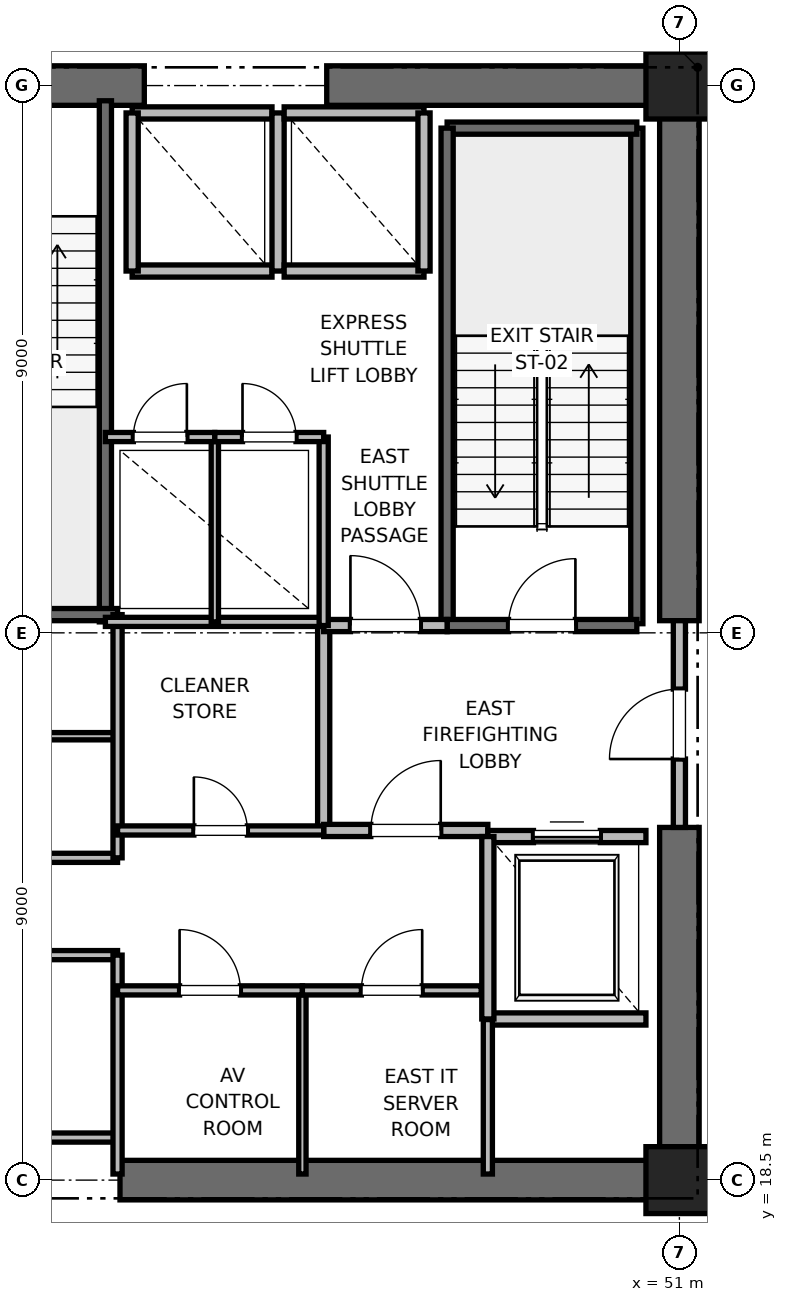
"""IFC4 building model, lengths in metres.
Left out: names, types, materials, properties, quantities, classifications, styles, units other than length and angle.
Written with IfcOpenShell. Run it as: python <this file> out.ifc"""

import sys

from ifc_helpers import new_model, si_unit, direction, frame, frame_2d, origin, origin_2d, place, context, subcontext, project, spatial, rectangle, extrude, element, fill, save


model = new_model("IFC4")
c1 = context("Model", 3, precision=1e-05, world=origin(), true_north=direction((0.0, 1.0)))
c2 = subcontext(c1, "Body", "Model", "MODEL_VIEW")
j1 = project(units=[si_unit("LENGTHUNIT", "METRE"), si_unit("PLANEANGLEUNIT", "RADIAN")], contexts=[c1])
p1 = place(None, origin())
s1 = spatial("IfcSite", under=j1, at=p1, CompositionType="ELEMENT")
p2 = place(p1, origin())
s2 = spatial("IfcBuilding", under=s1, at=p2, CompositionType="ELEMENT")
p3 = place(p2, frame((0.0, 0.0, 47.6)))
s3 = spatial("IfcBuildingStorey", under=s2, at=p3, CompositionType="ELEMENT", Elevation=47.6)
for number, where, z_axis, x_axis in (
    (1, (51.0, 18.5, 0.0), (0.0, 0.0, 1.0), (1.0, 0.0, 0.0)),
    (2, (51.0, 36.5, 0.0), (0.0, 0.0, 1.0), (1.0, 0.0, 0.0)),
):
    element("IfcColumn", number, at=place(p3, frame(where, z_axis=z_axis, x_axis=x_axis)), inside=s3, PredefinedType="PILASTER", context=c2, shape_type="SweptSolid", body=[
        extrude(rectangle(XDim=1.1, YDim=1.1, at=origin_2d()), origin(), (0.0, 0.0, 1.0), 4.0),
    ])
p4 = place(p3, frame((41.8, 18.5, 0.0), z_axis=(0.0, 0.0, 1.0), x_axis=(1.0, 0.0, 0.0)))
e3 = element("IfcWall", 3, at=p4, inside=s3, PredefinedType="SHEAR", context=c2, shape_type="SweptSolid", body=[
    extrude(rectangle(XDim=9.2, YDim=0.65, at=frame_2d((4.6, 0.0))), origin(), (0.0, 0.0, 1.0), 3.76),
])
p5 = place(p3, frame((37.8, 36.5, 0.0), z_axis=(0.0, 0.0, 1.0), x_axis=(1.0, 0.0, 0.0)))
e4 = element("IfcWall", 4, at=p5, inside=s3, PredefinedType="SHEAR", context=c2, shape_type="SweptSolid", body=[
    extrude(rectangle(XDim=4.4, YDim=0.65, at=frame_2d((2.2, 0.0))), origin(), (0.0, 0.0, 1.0), 3.76),
])
p6 = place(p5, frame((1.65, 0.0, 0.0)))
e5 = element("IfcOpeningElement", 5, at=p6, cuts=e4, PredefinedType="OPENING", context=c2, shape_type="SweptSolid", body=[
    extrude(rectangle(XDim=1.1, YDim=2.15, at=frame_2d((0.55, 1.075))), frame((0.0, 0.325, 0.0), z_axis=(0.0, -1.0, 0.0), x_axis=(1.0, 0.0, 0.0)), (0.0, 0.0, 1.0), 0.65),
])
for number, where, z_axis, x_axis in (
    (6, (45.2, 36.5, 0.0), (0.0, 0.0, 1.0), (1.0, 0.0, 0.0)),
    (7, (51.0, 18.5, 0.0), (0.0, 0.0, 1.0), (0.0, 1.0, 0.0)),
):
    element("IfcWall", number, at=place(p3, frame(where, z_axis=z_axis, x_axis=x_axis)), inside=s3, PredefinedType="SHEAR", context=c2, shape_type="SweptSolid", body=[
        extrude(rectangle(XDim=5.8, YDim=0.65, at=frame_2d((2.9, 0.0))), origin(), (0.0, 0.0, 1.0), 3.76),
    ])
p7 = place(p3, frame((51.0, 27.7, 0.0), z_axis=(0.0, 0.0, 1.0), x_axis=(0.0, 1.0, 0.0)))
e8 = element("IfcWall", 8, at=p7, inside=s3, PredefinedType="SHEAR", context=c2, shape_type="SweptSolid", body=[
    extrude(rectangle(XDim=8.8, YDim=0.65, at=frame_2d((4.4, 0.0))), origin(), (0.0, 0.0, 1.0), 3.76),
])
p8 = place(p3, frame((50.3, 27.65, 0.0), z_axis=(0.0, 0.0, 1.0), x_axis=(0.0, 1.0, 0.0)))
e9 = element("IfcWall", 9, at=p8, inside=s3, PredefinedType="SOLIDWALL", context=c2, shape_type="SweptSolid", body=[
    extrude(rectangle(XDim=8.15, YDim=0.2, at=frame_2d((4.075, 0.0))), origin(), (0.0, 0.0, 1.0), 3.76),
])
p9 = place(p3, frame((47.18, 35.8, 0.0), z_axis=(0.0, 0.0, 1.0), x_axis=(1.0, 0.0, 0.0)))
e10 = element("IfcWall", 10, at=p9, inside=s3, PredefinedType="SOLIDWALL", context=c2, shape_type="SweptSolid", body=[
    extrude(rectangle(XDim=3.12, YDim=0.2, at=frame_2d((1.56, 0.0))), origin(), (0.0, 0.0, 1.0), 3.76),
])
p10 = place(p3, frame((47.18, 27.62, 0.0), z_axis=(0.0, 0.0, 1.0), x_axis=(0.0, 1.0, 0.0)))
e11 = element("IfcWall", 11, at=p10, inside=s3, PredefinedType="SOLIDWALL", context=c2, shape_type="SweptSolid", body=[
    extrude(rectangle(XDim=8.18, YDim=0.2, at=frame_2d((4.09, 0.0))), origin(), (0.0, 0.0, 1.0), 3.76),
])
p11 = place(p3, frame((47.18, 27.62, 0.0), z_axis=(0.0, 0.0, 1.0), x_axis=(1.0, 0.0, 0.0)))
e12 = element("IfcWall", 12, at=p11, inside=s3, PredefinedType="SOLIDWALL", context=c2, shape_type="SweptSolid", body=[
    extrude(rectangle(XDim=3.12, YDim=0.2, at=frame_2d((1.56, 0.0))), origin(), (0.0, 0.0, 1.0), 3.76),
])
p12 = place(p11, frame((1.01, 0.0, 0.0)))
e13 = element("IfcOpeningElement", 13, at=p12, cuts=e12, PredefinedType="OPENING", context=c2, shape_type="SweptSolid", body=[
    extrude(rectangle(XDim=1.1, YDim=2.15, at=frame_2d((0.55, 1.075))), frame((0.0, 0.1, 0.0), z_axis=(0.0, -1.0, 0.0), x_axis=(1.0, 0.0, 0.0)), (0.0, 0.0, 1.0), 0.2),
])
p13 = place(p3, frame((41.56, 27.68, 0.0), z_axis=(0.0, 0.0, 1.0), x_axis=(0.0, 1.0, 0.0)))
e14 = element("IfcWall", 14, at=p13, inside=s3, PredefinedType="SOLIDWALL", context=c2, shape_type="SweptSolid", body=[
    extrude(rectangle(XDim=8.57, YDim=0.2, at=frame_2d((4.285, 0.0))), origin(), (0.0, 0.0, 1.0), 3.76),
])
p14 = place(p3, frame((38.44, 27.8, 0.0), z_axis=(0.0, 0.0, 1.0), x_axis=(1.0, 0.0, 0.0)))
e15 = element("IfcWall", 15, at=p14, inside=s3, PredefinedType="SOLIDWALL", context=c2, shape_type="SweptSolid", body=[
    extrude(rectangle(XDim=3.32, YDim=0.2, at=frame_2d((1.66, 0.0))), origin(), (0.0, 0.0, 1.0), 3.76),
])
p15 = place(p3, frame((45.15, 24.25, 0.0), z_axis=(0.0, 0.0, 1.0), x_axis=(0.0, 1.0, 0.0)))
e16 = element("IfcWall", 16, at=p15, inside=s3, PredefinedType="PARTITIONING", context=c2, shape_type="SweptSolid", body=[
    extrude(rectangle(XDim=3.37, YDim=0.2, at=frame_2d((1.685, 0.0))), origin(), (0.0, 0.0, 1.0), 3.76),
])
p16 = place(p3, frame((45.15, 24.25, 0.0), z_axis=(0.0, 0.0, 1.0), x_axis=(1.0, 0.0, 0.0)))
e17 = element("IfcWall", 17, at=p16, inside=s3, PredefinedType="PARTITIONING", context=c2, shape_type="SweptSolid", body=[
    extrude(rectangle(XDim=2.7, YDim=0.2, at=frame_2d((1.35, 0.0))), origin(), (0.0, 0.0, 1.0), 3.76),
])
p17 = place(p16, frame((0.775, 0.0, 0.0)))
e18 = element("IfcOpeningElement", 18, at=p17, cuts=e17, PredefinedType="OPENING", context=c2, shape_type="SweptSolid", body=[
    extrude(rectangle(XDim=1.15, YDim=2.2, at=frame_2d((0.575, 1.1))), frame((0.0, 0.1, 0.0), z_axis=(0.0, -1.0, 0.0), x_axis=(1.0, 0.0, 0.0)), (0.0, 0.0, 1.0), 0.2),
])
p18 = place(p3, frame((45.15, 27.62, 0.0), z_axis=(0.0, 0.0, 1.0), x_axis=(1.0, 0.0, 0.0)))
e19 = element("IfcWall", 19, at=p18, inside=s3, PredefinedType="PARTITIONING", context=c2, shape_type="SweptSolid", body=[
    extrude(rectangle(XDim=2.03, YDim=0.2, at=frame_2d((1.015, 0.0))), origin(), (0.0, 0.0, 1.0), 3.76),
])
p19 = place(p18, frame((0.44, 0.0, 0.0)))
e20 = element("IfcOpeningElement", 20, at=p19, cuts=e19, PredefinedType="OPENING", context=c2, shape_type="SweptSolid", body=[
    extrude(rectangle(XDim=1.15, YDim=2.2, at=frame_2d((0.575, 1.1))), frame((0.0, 0.1, 0.0), z_axis=(0.0, -1.0, 0.0), x_axis=(1.0, 0.0, 0.0)), (0.0, 0.0, 1.0), 0.2),
])
p20 = place(p3, frame((51.0, 24.3, 0.0), z_axis=(0.0, 0.0, 1.0), x_axis=(0.0, 1.0, 0.0)))
e21 = element("IfcWall", 21, at=p20, inside=s3, PredefinedType="PARTITIONING", context=c2, shape_type="SweptSolid", body=[
    extrude(rectangle(XDim=3.4, YDim=0.2, at=frame_2d((1.7, 0.0))), origin(), (0.0, 0.0, 1.0), 2.54),
])
p21 = place(p20, frame((1.125, 0.0, 0.0)))
e22 = element("IfcOpeningElement", 22, at=p21, cuts=e21, PredefinedType="OPENING", context=c2, shape_type="SweptSolid", body=[
    extrude(rectangle(XDim=1.15, YDim=2.2, at=frame_2d((0.575, 1.1))), frame((0.0, 0.1, 0.0), z_axis=(0.0, -1.0, 0.0), x_axis=(1.0, 0.0, 0.0)), (0.0, 0.0, 1.0), 0.2),
])
p22 = place(p3, frame((47.85, 21.15, 0.0), z_axis=(0.0, 0.0, 1.0), x_axis=(1.0, 0.0, 0.0)))
e23 = element("IfcWall", 23, at=p22, inside=s3, PredefinedType="SOLIDWALL", context=c2, shape_type="SweptSolid", body=[
    extrude(rectangle(XDim=2.6, YDim=0.2, at=frame_2d((1.3, 0.0))), origin(), (0.0, 0.0, 1.0), 3.76),
])
p23 = place(p3, frame((50.45, 24.15, 0.0), z_axis=(0.0, 0.0, 1.0), x_axis=(-1.0, 0.0, 0.0)))
e24 = element("IfcWall", 24, at=p23, inside=s3, PredefinedType="SOLIDWALL", context=c2, shape_type="SweptSolid", body=[
    extrude(rectangle(XDim=2.6, YDim=0.2, at=frame_2d((1.3, 0.0))), origin(), (0.0, 0.0, 1.0), 2.54),
])
p24 = place(p23, frame((0.75, 0.0, 0.0)))
e25 = element("IfcOpeningElement", 25, at=p24, cuts=e24, PredefinedType="OPENING", context=c2, shape_type="SweptSolid", body=[
    extrude(rectangle(XDim=1.1, YDim=2.2, at=frame_2d((0.55, 1.1))), frame((0.0, 0.1, 0.0), z_axis=(0.0, -1.0, 0.0), x_axis=(1.0, 0.0, 0.0)), (0.0, 0.0, 1.0), 0.2),
])
p25 = place(p3, frame((47.85, 24.15, 0.0), z_axis=(0.0, 0.0, 1.0), x_axis=(0.0, -1.0, 0.0)))
e26 = element("IfcWall", 26, at=p25, inside=s3, PredefinedType="SOLIDWALL", context=c2, shape_type="SweptSolid", body=[
    extrude(rectangle(XDim=3.0, YDim=0.2, at=frame_2d((1.5, 0.0))), origin(), (0.0, 0.0, 1.0), 3.76),
])
p26 = place(p3, frame((42.0, 33.45, 0.0), z_axis=(0.0, 0.0, 1.0), x_axis=(1.0, 0.0, 0.0)))
e27 = element("IfcWall", 27, at=p26, inside=s3, PredefinedType="SOLIDWALL", context=c2, shape_type="SweptSolid", body=[
    extrude(rectangle(XDim=2.3, YDim=0.2, at=frame_2d((1.15, 0.0))), origin(), (0.0, 0.0, 1.0), 3.76),
])
p27 = place(p3, frame((44.3, 36.05, 0.0), z_axis=(0.0, 0.0, 1.0), x_axis=(-1.0, 0.0, 0.0)))
e28 = element("IfcWall", 28, at=p27, inside=s3, PredefinedType="SOLIDWALL", context=c2, shape_type="SweptSolid", body=[
    extrude(rectangle(XDim=2.3, YDim=0.2, at=frame_2d((1.15, 0.0))), origin(), (0.0, 0.0, 1.0), 2.54),
])
for number, where, z_axis, x_axis in (
    (29, (42.0, 36.05, 0.0), (0.0, 0.0, 1.0), (0.0, -1.0, 0.0)),
    (30, (44.4, 33.45, 0.0), (0.0, 0.0, 1.0), (0.0, 1.0, 0.0)),
):
    element("IfcWall", number, at=place(p3, frame(where, z_axis=z_axis, x_axis=x_axis)), inside=s3, PredefinedType="SOLIDWALL", context=c2, shape_type="SweptSolid", body=[
        extrude(rectangle(XDim=2.6, YDim=0.2, at=frame_2d((1.3, 0.0))), origin(), (0.0, 0.0, 1.0), 2.54),
    ])
p28 = place(p3, frame((44.5, 33.45, 0.0), z_axis=(0.0, 0.0, 1.0), x_axis=(1.0, 0.0, 0.0)))
e31 = element("IfcWall", 31, at=p28, inside=s3, PredefinedType="SOLIDWALL", context=c2, shape_type="SweptSolid", body=[
    extrude(rectangle(XDim=2.3, YDim=0.2, at=frame_2d((1.15, 0.0))), origin(), (0.0, 0.0, 1.0), 3.76),
])
p29 = place(p3, frame((46.8, 36.05, 0.0), z_axis=(0.0, 0.0, 1.0), x_axis=(-1.0, 0.0, 0.0)))
e32 = element("IfcWall", 32, at=p29, inside=s3, PredefinedType="SOLIDWALL", context=c2, shape_type="SweptSolid", body=[
    extrude(rectangle(XDim=2.3, YDim=0.2, at=frame_2d((1.15, 0.0))), origin(), (0.0, 0.0, 1.0), 2.54),
])
p30 = place(p3, frame((46.8, 33.45, 0.0), z_axis=(0.0, 0.0, 1.0), x_axis=(0.0, 1.0, 0.0)))
e33 = element("IfcWall", 33, at=p30, inside=s3, PredefinedType="SOLIDWALL", context=c2, shape_type="SweptSolid", body=[
    extrude(rectangle(XDim=2.6, YDim=0.2, at=frame_2d((1.3, 0.0))), origin(), (0.0, 0.0, 1.0), 3.76),
])
for number, where, z_axis, x_axis in (
    (34, (39.95, 19.2, 0.0), (0.0, 0.0, 1.0), (1.0, 0.0, 0.0)),
    (35, (39.95, 22.2, 0.0), (0.0, 0.0, 1.0), (1.0, 0.0, 0.0)),
    (36, (39.95, 23.8, 0.0), (0.0, 0.0, 1.0), (1.0, 0.0, 0.0)),
):
    element("IfcWall", number, at=place(p3, frame(where, z_axis=z_axis, x_axis=x_axis)), inside=s3, PredefinedType="PARTITIONING", context=c2, shape_type="SweptSolid", body=[
        extrude(rectangle(XDim=1.81, YDim=0.15, at=frame_2d((0.905, 0.0))), origin(), (0.0, 0.0, 1.0), 2.85),
    ])
p31 = place(p3, frame((39.95, 25.8, 0.0), z_axis=(0.0, 0.0, 1.0), x_axis=(1.0, 0.0, 0.0)))
e37 = element("IfcWall", 37, at=p31, inside=s3, PredefinedType="PARTITIONING", context=c2, shape_type="SweptSolid", body=[
    extrude(rectangle(XDim=1.81, YDim=0.12, at=frame_2d((0.905, 0.0))), origin(), (0.0, 0.0, 1.0), 2.85),
])
p32 = place(p3, frame((41.76, 18.6, 0.0), z_axis=(0.0, 0.0, 1.0), x_axis=(0.0, 1.0, 0.0)))
e38 = element("IfcWall", 38, at=p32, inside=s3, PredefinedType="PARTITIONING", context=c2, shape_type="SweptSolid", body=[
    extrude(rectangle(XDim=3.6, YDim=0.15, at=frame_2d((1.8, 0.0))), origin(), (0.0, 0.0, 1.0), 2.54),
])
p33 = place(p3, frame((41.76, 23.8, 0.0), z_axis=(0.0, 0.0, 1.0), x_axis=(0.0, 1.0, 0.0)))
e39 = element("IfcWall", 39, at=p33, inside=s3, PredefinedType="PARTITIONING", context=c2, shape_type="SweptSolid", body=[
    extrude(rectangle(XDim=4.0, YDim=0.15, at=frame_2d((2.0, 0.0))), origin(), (0.0, 0.0, 1.0), 2.85),
])
p34 = place(p3, frame((41.56, 27.68, 0.0), z_axis=(0.0, 0.0, 1.0), x_axis=(1.0, 0.0, 0.0)))
e40 = element("IfcWall", 40, at=p34, inside=s3, PredefinedType="PARTITIONING", context=c2, shape_type="SweptSolid", body=[
    extrude(rectangle(XDim=3.59, YDim=0.15, at=frame_2d((1.795, 0.0))), origin(), (0.0, 0.0, 1.0), 2.85),
])
p35 = place(p3, frame((47.85, 18.6, 0.0), z_axis=(0.0, 0.0, 1.0), x_axis=(0.0, 1.0, 0.0)))
e41 = element("IfcWall", 41, at=p35, inside=s3, PredefinedType="PARTITIONING", context=c2, shape_type="SweptSolid", body=[
    extrude(rectangle(XDim=2.54, YDim=0.15, at=frame_2d((1.27, 0.0))), origin(), (0.0, 0.0, 1.0), 2.85),
])
p36 = place(p3, frame((44.8, 18.6, 0.0), z_axis=(0.0, 0.0, 1.0), x_axis=(0.0, 1.0, 0.0)))
e42 = element("IfcWall", 42, at=p36, inside=s3, PredefinedType="PARTITIONING", context=c2, shape_type="SweptSolid", body=[
    extrude(rectangle(XDim=3.02, YDim=0.12, at=frame_2d((1.51, 0.0))), origin(), (0.0, 0.0, 1.0), 2.85),
])
p37 = place(p3, frame((41.76, 21.62, 0.0), z_axis=(0.0, 0.0, 1.0), x_axis=(1.0, 0.0, 0.0)))
e43 = element("IfcWall", 43, at=p37, inside=s3, PredefinedType="PARTITIONING", context=c2, shape_type="SweptSolid", body=[
    extrude(rectangle(XDim=3.04, YDim=0.15, at=frame_2d((1.52, 0.0))), origin(), (0.0, 0.0, 1.0), 2.85),
])
p38 = place(p37, frame((1.02, 0.0, 0.0)))
e44 = element("IfcOpeningElement", 44, at=p38, cuts=e43, PredefinedType="OPENING", context=c2, shape_type="SweptSolid", body=[
    extrude(rectangle(XDim=1.0, YDim=2.15, at=frame_2d((0.5, 1.075))), frame((0.0, 0.075, 0.0), z_axis=(0.0, -1.0, 0.0), x_axis=(1.0, 0.0, 0.0)), (0.0, 0.0, 1.0), 0.15),
])
p39 = place(p3, frame((44.8, 21.62, 0.0), z_axis=(0.0, 0.0, 1.0), x_axis=(1.0, 0.0, 0.0)))
e45 = element("IfcWall", 45, at=p39, inside=s3, PredefinedType="PARTITIONING", context=c2, shape_type="SweptSolid", body=[
    extrude(rectangle(XDim=2.94, YDim=0.15, at=frame_2d((1.47, 0.0))), origin(), (0.0, 0.0, 1.0), 2.85),
])
p40 = place(p39, frame((0.97, 0.0, 0.0)))
e46 = element("IfcOpeningElement", 46, at=p40, cuts=e45, PredefinedType="OPENING", context=c2, shape_type="SweptSolid", body=[
    extrude(rectangle(XDim=1.0, YDim=2.15, at=frame_2d((0.5, 1.075))), frame((0.0, 0.075, 0.0), z_axis=(0.0, -1.0, 0.0), x_axis=(1.0, 0.0, 0.0)), (0.0, 0.0, 1.0), 0.15),
])
p41 = place(p3, frame((41.76, 24.25, 0.0), z_axis=(0.0, 0.0, 1.0), x_axis=(1.0, 0.0, 0.0)))
e47 = element("IfcWall", 47, at=p41, inside=s3, PredefinedType="PARTITIONING", context=c2, shape_type="SweptSolid", body=[
    extrude(rectangle(XDim=3.39, YDim=0.15, at=frame_2d((1.695, 0.0))), origin(), (0.0, 0.0, 1.0), 2.85),
])
p42 = place(p41, frame((1.255, 0.0, 0.0)))
e48 = element("IfcOpeningElement", 48, at=p42, cuts=e47, PredefinedType="OPENING", context=c2, shape_type="SweptSolid", body=[
    extrude(rectangle(XDim=0.88, YDim=2.1, at=frame_2d((0.44, 1.05))), frame((0.0, 0.075, 0.0), z_axis=(0.0, -1.0, 0.0), x_axis=(1.0, 0.0, 0.0)), (0.0, 0.0, 1.0), 0.15),
])
p43 = place(p3, frame((45.15, 27.62, 0.0), z_axis=(0.0, 0.0, 1.0), x_axis=(0.0, 1.0, 0.0)))
e49 = element("IfcWall", 49, at=p43, inside=s3, PredefinedType="PARTITIONING", context=c2, shape_type="SweptSolid", body=[
    extrude(rectangle(XDim=3.1, YDim=0.15, at=frame_2d((1.55, 0.0))), origin(), (0.0, 0.0, 1.0), 2.85),
])
p44 = place(p3, frame((43.36, 27.68, 0.0), z_axis=(0.0, 0.0, 1.0), x_axis=(0.0, 1.0, 0.0)))
e50 = element("IfcWall", 50, at=p44, inside=s3, PredefinedType="PARTITIONING", context=c2, shape_type="SweptSolid", body=[
    extrude(rectangle(XDim=3.04, YDim=0.12, at=frame_2d((1.52, 0.0))), origin(), (0.0, 0.0, 1.0), 2.85),
])
p45 = place(p3, frame((41.56, 30.72, 0.0), z_axis=(0.0, 0.0, 1.0), x_axis=(1.0, 0.0, 0.0)))
e51 = element("IfcWall", 51, at=p45, inside=s3, PredefinedType="PARTITIONING", context=c2, shape_type="SweptSolid", body=[
    extrude(rectangle(XDim=1.8, YDim=0.15, at=frame_2d((0.9, 0.0))), origin(), (0.0, 0.0, 1.0), 2.85),
])
p46 = place(p45, frame((0.46, 0.0, 0.0)))
e52 = element("IfcOpeningElement", 52, at=p46, cuts=e51, PredefinedType="OPENING", context=c2, shape_type="SweptSolid", body=[
    extrude(rectangle(XDim=0.88, YDim=2.1, at=frame_2d((0.44, 1.05))), frame((0.0, 0.075, 0.0), z_axis=(0.0, -1.0, 0.0), x_axis=(1.0, 0.0, 0.0)), (0.0, 0.0, 1.0), 0.15),
])
p47 = place(p3, frame((43.36, 30.72, 0.0), z_axis=(0.0, 0.0, 1.0), x_axis=(1.0, 0.0, 0.0)))
e53 = element("IfcWall", 53, at=p47, inside=s3, PredefinedType="PARTITIONING", context=c2, shape_type="SweptSolid", body=[
    extrude(rectangle(XDim=1.79, YDim=0.15, at=frame_2d((0.895, 0.0))), origin(), (0.0, 0.0, 1.0), 2.85),
])
p48 = place(p47, frame((0.455, 0.0, 0.0)))
e54 = element("IfcOpeningElement", 54, at=p48, cuts=e53, PredefinedType="OPENING", context=c2, shape_type="SweptSolid", body=[
    extrude(rectangle(XDim=0.88, YDim=2.1, at=frame_2d((0.44, 1.05))), frame((0.0, 0.075, 0.0), z_axis=(0.0, -1.0, 0.0), x_axis=(1.0, 0.0, 0.0)), (0.0, 0.0, 1.0), 0.15),
])
p49 = place(p12, origin())
e55 = element("IfcDoor", 55, at=p49, inside=s3, OperationType="SINGLE_SWING_RIGHT", PredefinedType="DOOR", context=c2, shape_type="SweptSolid", body=[
    extrude(rectangle(XDim=1.1, YDim=2.15, at=frame_2d((0.55, 1.075))), frame((0.0, 0.025, 0.0), z_axis=(0.0, -1.0, 0.0), x_axis=(1.0, 0.0, 0.0)), (0.0, 0.0, 1.0), 0.05),
])
fill(e13, e55)
p50 = place(p17, origin())
e56 = element("IfcDoor", 56, at=p50, inside=s3, OperationType="SINGLE_SWING_RIGHT", PredefinedType="DOOR", context=c2, shape_type="SweptSolid", body=[
    extrude(rectangle(XDim=1.15, YDim=2.2, at=frame_2d((0.575, 1.1))), frame((0.0, 0.025, 0.0), z_axis=(0.0, -1.0, 0.0), x_axis=(1.0, 0.0, 0.0)), (0.0, 0.0, 1.0), 0.05),
])
fill(e18, e56)
p51 = place(p19, origin())
e57 = element("IfcDoor", 57, at=p51, inside=s3, OperationType="SINGLE_SWING_LEFT", PredefinedType="DOOR", context=c2, shape_type="SweptSolid", body=[
    extrude(rectangle(XDim=1.15, YDim=2.2, at=frame_2d((0.575, 1.1))), frame((0.0, 0.025, 0.0), z_axis=(0.0, -1.0, 0.0), x_axis=(1.0, 0.0, 0.0)), (0.0, 0.0, 1.0), 0.05),
])
fill(e20, e57)
p52 = place(p21, origin())
e58 = element("IfcDoor", 58, at=p52, inside=s3, OperationType="SINGLE_SWING_LEFT", PredefinedType="DOOR", context=c2, shape_type="SweptSolid", body=[
    extrude(rectangle(XDim=1.15, YDim=2.2, at=frame_2d((0.575, 1.1))), frame((0.0, 0.025, 0.0), z_axis=(0.0, -1.0, 0.0), x_axis=(1.0, 0.0, 0.0)), (0.0, 0.0, 1.0), 0.05),
])
fill(e22, e58)
p53 = place(p24, origin())
e59 = element("IfcDoor", 59, at=p53, inside=s3, OperationType="SLIDING_TO_RIGHT", PredefinedType="DOOR", context=c2, shape_type="SweptSolid", body=[
    extrude(rectangle(XDim=1.1, YDim=2.2, at=frame_2d((0.55, 1.1))), frame((0.0, 0.025, 0.0), z_axis=(0.0, -1.0, 0.0), x_axis=(1.0, 0.0, 0.0)), (0.0, 0.0, 1.0), 0.05),
])
fill(e25, e59)
p54 = place(p38, origin())
e60 = element("IfcDoor", 60, at=p54, inside=s3, OperationType="SINGLE_SWING_LEFT", PredefinedType="DOOR", context=c2, shape_type="SweptSolid", body=[
    extrude(rectangle(XDim=1.0, YDim=2.15, at=frame_2d((0.5, 1.075))), frame((0.0, 0.025, 0.0), z_axis=(0.0, -1.0, 0.0), x_axis=(1.0, 0.0, 0.0)), (0.0, 0.0, 1.0), 0.05),
])
fill(e44, e60)
p55 = place(p40, origin())
e61 = element("IfcDoor", 61, at=p55, inside=s3, OperationType="SINGLE_SWING_RIGHT", PredefinedType="DOOR", context=c2, shape_type="SweptSolid", body=[
    extrude(rectangle(XDim=1.0, YDim=2.15, at=frame_2d((0.5, 1.075))), frame((0.0, 0.025, 0.0), z_axis=(0.0, -1.0, 0.0), x_axis=(1.0, 0.0, 0.0)), (0.0, 0.0, 1.0), 0.05),
])
fill(e46, e61)
p56 = place(p42, origin())
e62 = element("IfcDoor", 62, at=p56, inside=s3, OperationType="SINGLE_SWING_LEFT", PredefinedType="DOOR", context=c2, shape_type="SweptSolid", body=[
    extrude(rectangle(XDim=0.88, YDim=2.1, at=frame_2d((0.44, 1.05))), frame((0.0, 0.025, 0.0), z_axis=(0.0, -1.0, 0.0), x_axis=(1.0, 0.0, 0.0)), (0.0, 0.0, 1.0), 0.05),
])
fill(e48, e62)
p57 = place(p46, origin())
e63 = element("IfcDoor", 63, at=p57, inside=s3, OperationType="SINGLE_SWING_RIGHT", PredefinedType="DOOR", context=c2, shape_type="SweptSolid", body=[
    extrude(rectangle(XDim=0.88, YDim=2.1, at=frame_2d((0.44, 1.05))), frame((0.0, 0.025, 0.0), z_axis=(0.0, -1.0, 0.0), x_axis=(1.0, 0.0, 0.0)), (0.0, 0.0, 1.0), 0.05),
])
fill(e52, e63)
p58 = place(p48, origin())
e64 = element("IfcDoor", 64, at=p58, inside=s3, OperationType="SINGLE_SWING_LEFT", PredefinedType="DOOR", context=c2, shape_type="SweptSolid", body=[
    extrude(rectangle(XDim=0.88, YDim=2.1, at=frame_2d((0.44, 1.05))), frame((0.0, 0.025, 0.0), z_axis=(0.0, -1.0, 0.0), x_axis=(1.0, 0.0, 0.0)), (0.0, 0.0, 1.0), 0.05),
])
fill(e54, e64)
save(model, sys.argv[1])
